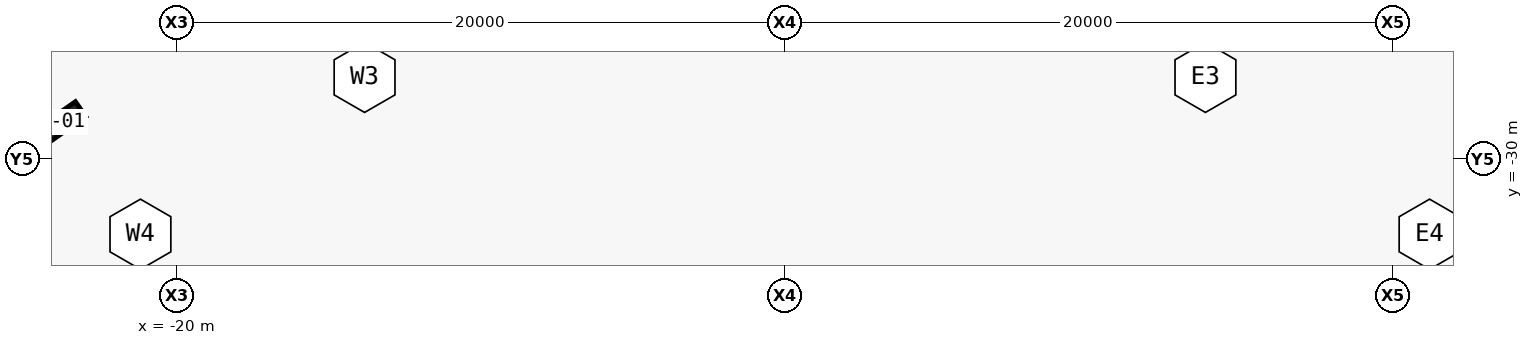
"""IFC4 building model, lengths in metres.
Left out: names, types, materials, properties, quantities, classifications, styles, units other than length and angle.
Written with IfcOpenShell. Run it as: python <this file> out.ifc"""

import sys

from ifc_helpers import new_model, si_unit, direction, frame, origin, origin_2d, place, context, subcontext, project, spatial, rectangle, extrude, element, save


model = new_model("IFC4")
c1 = context("Model", 3, precision=1e-05, world=origin(), true_north=direction((0.0, 1.0)))
c2 = subcontext(c1, "Body", "Model", "MODEL_VIEW")
j1 = project(units=[si_unit("LENGTHUNIT", "METRE"), si_unit("PLANEANGLEUNIT", "RADIAN")], contexts=[c1])
p1 = place(None, origin())
s1 = spatial("IfcSite", under=j1, at=p1, CompositionType="ELEMENT")
p2 = place(p1, origin())
s2 = spatial("IfcBuilding", under=s1, at=p2, CompositionType="ELEMENT")
p3 = place(p2, frame((0.0, 0.0, -4.5)))
s3 = spatial("IfcBuildingStorey", under=s2, at=p3, CompositionType="ELEMENT", Elevation=-4.5)
p4 = place(p3, frame((-23.782, -28.799, 0.0), z_axis=(0.0, 0.0, 1.0), x_axis=(-0.819152044289, -0.573576436351, 0.0)))
e1 = element("IfcColumn", 1, at=p4, inside=s3, PredefinedType="COLUMN", context=c2, shape_type="SweptSolid", body=[
    extrude(rectangle(XDim=1.5, YDim=0.6, at=origin_2d()), origin(), (0.0, 0.0, 1.0), 4.5),
])
save(model, sys.argv[1])
